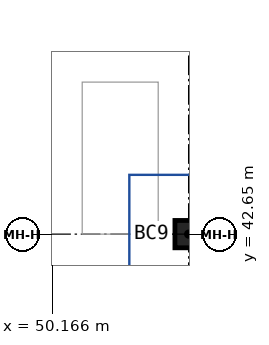
"""IFC4 building model, lengths in metres.
Left out: names, types, materials, properties, quantities, classifications, styles, units other than length and angle.
Written with IfcOpenShell. Run it as: python <this file> out.ifc"""

import sys

from ifc_helpers import new_model, si_unit, direction, frame, origin, origin_2d, place, context, subcontext, project, spatial, rectangle, extrude, source, transform, mapped, element, save


model = new_model("IFC4")
c1 = context("Model", 3, precision=1e-05, world=origin(), true_north=direction((0.0, 1.0)))
c2 = subcontext(c1, "Body", "Model", "MODEL_VIEW")
j1 = project(units=[si_unit("LENGTHUNIT", "METRE"), si_unit("PLANEANGLEUNIT", "RADIAN")], contexts=[c1])
p1 = place(None, origin())
s1 = spatial("IfcSite", under=j1, at=p1, CompositionType="ELEMENT")
p2 = place(p1, origin())
s2 = spatial("IfcBuilding", under=s1, at=p2, CompositionType="ELEMENT")
p3 = place(p2, frame((0.0, 0.0, -9.0)))
s3 = spatial("IfcBuildingStorey", under=s2, at=p3, CompositionType="ELEMENT", Elevation=-9.0)
m1 = source(origin(), c2, "Body", "SweptSolid", [
    extrude(rectangle(XDim=0.9, YDim=0.9, at=origin_2d()), origin(), (0.0, 0.0, 1.0), 4.5),
])
p4 = place(p3, frame((54.65, 42.65, 0.0), z_axis=(0.0, 0.0, 1.0), x_axis=(1.0, 0.0, 0.0)))
e1 = element("IfcColumn", 1, at=p4, inside=s3, PredefinedType="COLUMN", context=c2, shape_type="MappedRepresentation", body=[
    mapped(m1, transform((0.0, 0.0, 0.0))),
])
save(model, sys.argv[1])
